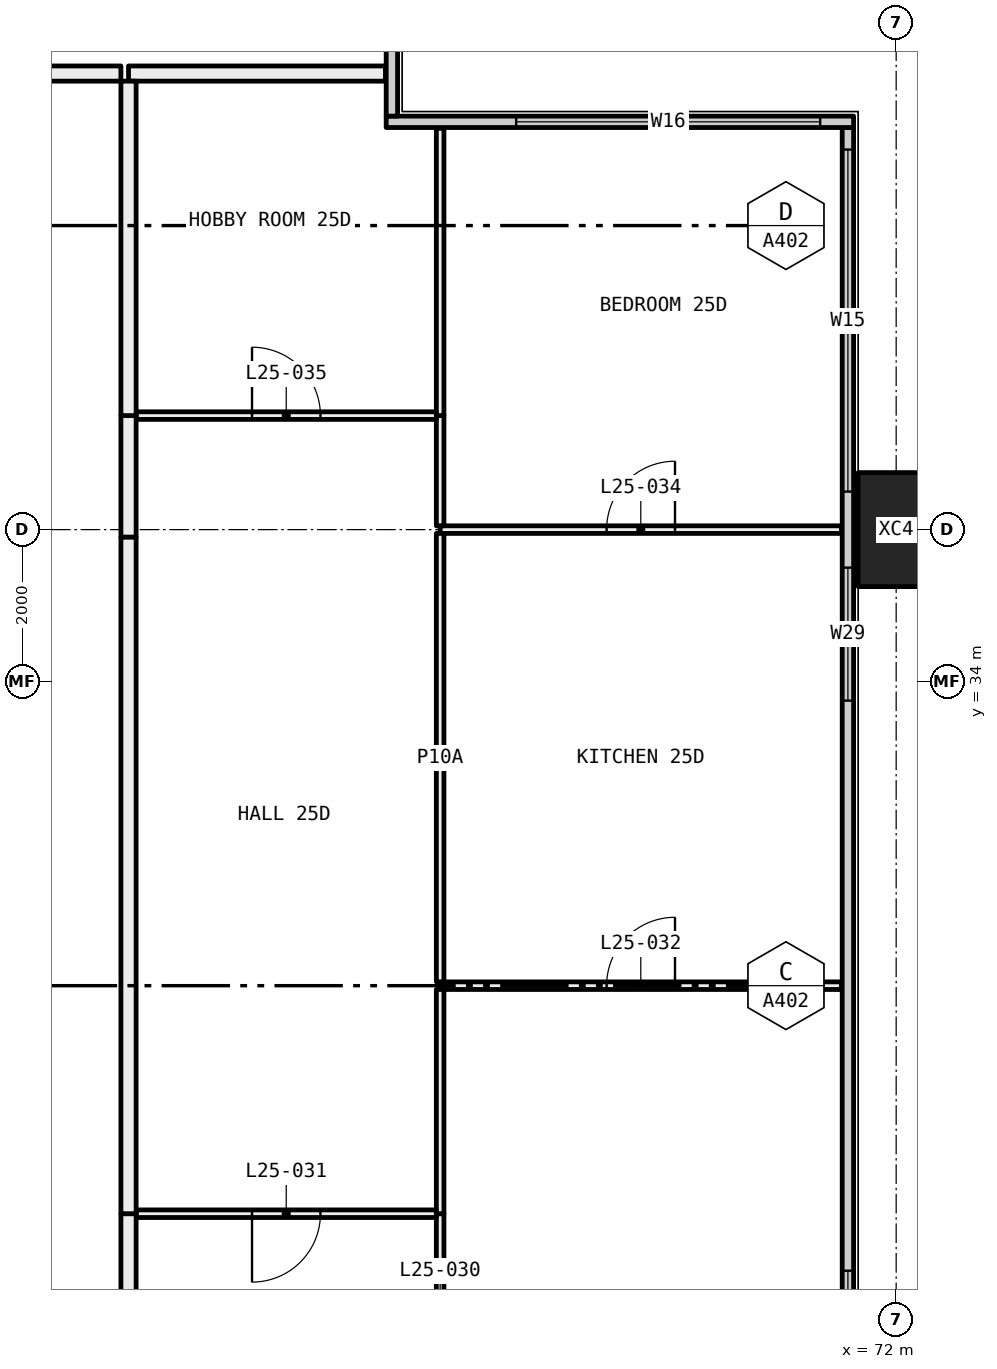
"""IFC4 building model, lengths in metres.
Left out: names, types, materials, properties, quantities, classifications, styles, units other than length and angle.
Written with IfcOpenShell. Run it as: python <this file> out.ifc"""

import sys

from ifc_helpers import new_model, si_unit, direction, frame, frame_2d, origin, origin_2d, place, context, subcontext, project, spatial, rectangle, hollow_rectangle, extrude, element, fill, save


model = new_model("IFC4")
c1 = context("Model", 3, precision=1e-05, world=origin(), true_north=direction((0.0, 1.0)))
c2 = subcontext(c1, "Body", "Model", "MODEL_VIEW")
j1 = project(units=[si_unit("LENGTHUNIT", "METRE"), si_unit("PLANEANGLEUNIT", "RADIAN")], contexts=[c1])
p1 = place(None, origin())
s1 = spatial("IfcSite", under=j1, at=p1, CompositionType="ELEMENT")
p2 = place(p1, origin())
s2 = spatial("IfcBuilding", under=s1, at=p2, CompositionType="ELEMENT")
p3 = place(p2, frame((0.0, 0.0, 100.05)))
s3 = spatial("IfcBuildingStorey", under=s2, at=p3, CompositionType="ELEMENT", Elevation=100.05)
p4 = place(p3, frame((72.0, 36.0, -0.4), z_axis=(0.0, 0.0, 1.0), x_axis=(0.0, 1.0, 0.0)))
e1 = element("IfcColumn", 1, at=p4, inside=s3, PredefinedType="COLUMN", context=c2, shape_type="SweptSolid", body=[
    extrude(hollow_rectangle(XDim=1.5, YDim=1.0, WallThickness=0.06, at=origin_2d()), origin(), (0.0, 0.0, 1.0), 3.45),
])
p5 = place(p3, frame((71.365, 18.71, 0.0), z_axis=(0.0, 0.0, 1.0), x_axis=(0.0, 1.0, 0.0)))
e2 = element("IfcWall", 2, at=p5, inside=s3, PredefinedType="ELEMENTEDWALL", context=c2, shape_type="SweptSolid", body=[
    extrude(rectangle(XDim=22.58, YDim=0.15, at=frame_2d((11.29, 0.0))), origin(), (0.0, 0.0, 1.0), 3.05),
])
p6 = place(p5, frame((0.29, 0.0, 0.45)))
e3 = element("IfcOpeningElement", 3, at=p6, cuts=e2, PredefinedType="OPENING", context=c2, shape_type="SweptSolid", body=[
    extrude(rectangle(XDim=4.5, YDim=2.55, at=frame_2d((2.25, 1.275))), frame((0.0, 0.085, 0.0), z_axis=(0.0, -1.0, 0.0), x_axis=(1.0, 0.0, 0.0)), (0.0, 0.0, 1.0), 0.17),
])
p7 = place(p5, frame((5.79, 0.0, 0.45)))
e4 = element("IfcOpeningElement", 4, at=p7, cuts=e2, PredefinedType="OPENING", context=c2, shape_type="SweptSolid", body=[
    extrude(rectangle(XDim=1.75, YDim=2.55, at=frame_2d((0.875, 1.275))), frame((0.0, 0.085, 0.0), z_axis=(0.0, -1.0, 0.0), x_axis=(1.0, 0.0, 0.0)), (0.0, 0.0, 1.0), 0.17),
])
p8 = place(p5, frame((15.04, 0.0, 0.45)))
e5 = element("IfcOpeningElement", 5, at=p8, cuts=e2, PredefinedType="OPENING", context=c2, shape_type="SweptSolid", body=[
    extrude(rectangle(XDim=1.75, YDim=2.55, at=frame_2d((0.875, 1.275))), frame((0.0, 0.085, 0.0), z_axis=(0.0, -1.0, 0.0), x_axis=(1.0, 0.0, 0.0)), (0.0, 0.0, 1.0), 0.17),
])
p9 = place(p5, frame((17.79, 0.0, 0.45)))
e6 = element("IfcOpeningElement", 6, at=p9, cuts=e2, PredefinedType="OPENING", context=c2, shape_type="SweptSolid", body=[
    extrude(rectangle(XDim=4.5, YDim=2.55, at=frame_2d((2.25, 1.275))), frame((0.0, 0.085, 0.0), z_axis=(0.0, -1.0, 0.0), x_axis=(1.0, 0.0, 0.0)), (0.0, 0.0, 1.0), 0.17),
])
p10 = place(p3, frame((65.29, 41.365, 0.0), z_axis=(0.0, 0.0, 1.0), x_axis=(1.0, 0.0, 0.0)))
e7 = element("IfcWall", 7, at=p10, inside=s3, PredefinedType="ELEMENTEDWALL", context=c2, shape_type="SweptSolid", body=[
    extrude(rectangle(XDim=6.15, YDim=0.15, at=frame_2d((3.075, 0.0))), origin(), (0.0, 0.0, 1.0), 3.05),
])
p11 = place(p10, frame((1.71, 0.0, 0.45)))
e8 = element("IfcOpeningElement", 8, at=p11, cuts=e7, PredefinedType="OPENING", context=c2, shape_type="SweptSolid", body=[
    extrude(rectangle(XDim=4.0, YDim=2.55, at=frame_2d((2.0, 1.275))), frame((0.0, 0.085, 0.0), z_axis=(0.0, -1.0, 0.0), x_axis=(1.0, 0.0, 0.0)), (0.0, 0.0, 1.0), 0.17),
])
p12 = place(p3, frame((65.365, 41.44, 0.0), z_axis=(0.0, 0.0, 1.0), x_axis=(0.0, 1.0, 0.0)))
e9 = element("IfcWall", 9, at=p12, inside=s3, PredefinedType="ELEMENTEDWALL", context=c2, shape_type="SweptSolid", body=[
    extrude(rectangle(XDim=5.85, YDim=0.15, at=frame_2d((2.925, 0.0))), origin(), (0.0, 0.0, 1.0), 3.05),
])
p13 = place(p12, frame((1.56, 0.0, 0.45)))
e10 = element("IfcOpeningElement", 10, at=p13, cuts=e9, PredefinedType="OPENING", context=c2, shape_type="SweptSolid", body=[
    extrude(rectangle(XDim=4.0, YDim=2.55, at=frame_2d((2.0, 1.275))), frame((0.0, 0.085, 0.0), z_axis=(0.0, -1.0, 0.0), x_axis=(1.0, 0.0, 0.0)), (0.0, 0.0, 1.0), 0.17),
])
p14 = place(p3, frame((71.28, 30.0, 0.0), z_axis=(0.0, 0.0, 1.0), x_axis=(-1.0, 0.0, 0.0)))
e11 = element("IfcWall", 11, at=p14, inside=s3, PredefinedType="PARTITIONING", context=c2, shape_type="SweptSolid", body=[
    extrude(rectangle(XDim=5.28, YDim=0.1, at=frame_2d((2.64, 0.0))), origin(), (0.0, 0.0, 1.0), 3.05),
])
p15 = place(p14, frame((2.19, 0.0, 0.0)))
e12 = element("IfcOpeningElement", 12, at=p15, cuts=e11, PredefinedType="OPENING", context=c2, shape_type="SweptSolid", body=[
    extrude(rectangle(XDim=0.9, YDim=2.1, at=frame_2d((0.45, 1.05))), frame((0.0, 0.06, 0.0), z_axis=(0.0, -1.0, 0.0), x_axis=(1.0, 0.0, 0.0)), (0.0, 0.0, 1.0), 0.12),
])
p16 = place(p3, frame((66.0, 27.0, 0.0), z_axis=(0.0, 0.0, 1.0), x_axis=(0.0, -1.0, 0.0)))
e13 = element("IfcWall", 13, at=p16, inside=s3, PredefinedType="PARTITIONING", context=c2, shape_type="SweptSolid", body=[
    extrude(rectangle(XDim=3.1, YDim=0.1, at=frame_2d((1.55, 0.0))), origin(), (0.0, 0.0, 1.0), 2.45),
])
p17 = place(p16, frame((1.1, 0.0, 0.0)))
e14 = element("IfcOpeningElement", 14, at=p17, cuts=e13, PredefinedType="OPENING", context=c2, shape_type="SweptSolid", body=[
    extrude(rectangle(XDim=0.9, YDim=2.1, at=frame_2d((0.45, 1.05))), frame((0.0, 0.06, 0.0), z_axis=(0.0, -1.0, 0.0), x_axis=(1.0, 0.0, 0.0)), (0.0, 0.0, 1.0), 0.12),
])
p18 = place(p3, frame((66.0, 29.95, 0.0), z_axis=(0.0, 0.0, 1.0), x_axis=(0.0, -1.0, 0.0)))
e15 = element("IfcWall", 15, at=p18, inside=s3, PredefinedType="PARTITIONING", context=c2, shape_type="SweptSolid", body=[
    extrude(rectangle(XDim=2.95, YDim=0.1, at=frame_2d((1.475, 0.0))), origin(), (0.0, 0.0, 1.0), 3.05),
])
p19 = place(p3, frame((71.28, 36.0, 0.0), z_axis=(0.0, 0.0, 1.0), x_axis=(-1.0, 0.0, 0.0)))
e16 = element("IfcWall", 16, at=p19, inside=s3, PredefinedType="PARTITIONING", context=c2, shape_type="SweptSolid", body=[
    extrude(rectangle(XDim=5.28, YDim=0.1, at=frame_2d((2.64, 0.0))), origin(), (0.0, 0.0, 1.0), 2.45),
])
p20 = place(p19, frame((2.19, 0.0, 0.0)))
e17 = element("IfcOpeningElement", 17, at=p20, cuts=e16, PredefinedType="OPENING", context=c2, shape_type="SweptSolid", body=[
    extrude(rectangle(XDim=0.9, YDim=2.1, at=frame_2d((0.45, 1.05))), frame((0.0, 0.06, 0.0), z_axis=(0.0, -1.0, 0.0), x_axis=(1.0, 0.0, 0.0)), (0.0, 0.0, 1.0), 0.12),
])
p21 = place(p3, frame((66.0, 35.95, 0.0), z_axis=(0.0, 0.0, 1.0), x_axis=(0.0, -1.0, 0.0)))
e18 = element("IfcWall", 18, at=p21, inside=s3, PredefinedType="PARTITIONING", context=c2, shape_type="SweptSolid", body=[
    extrude(rectangle(XDim=5.9, YDim=0.1, at=frame_2d((2.95, 0.0))), origin(), (0.0, 0.0, 1.0), 2.45),
])
p22 = place(p3, frame((66.0, 37.5, 0.0), z_axis=(0.0, 0.0, 1.0), x_axis=(0.0, -1.0, 0.0)))
e19 = element("IfcWall", 19, at=p22, inside=s3, PredefinedType="PARTITIONING", context=c2, shape_type="SweptSolid", body=[
    extrude(rectangle(XDim=1.45, YDim=0.1, at=frame_2d((0.725, 0.0))), origin(), (0.0, 0.0, 1.0), 2.45),
])
p23 = place(p3, frame((66.0, 41.28, 0.0), z_axis=(0.0, 0.0, 1.0), x_axis=(0.0, -1.0, 0.0)))
e20 = element("IfcWall", 20, at=p23, inside=s3, PredefinedType="PARTITIONING", context=c2, shape_type="SweptSolid", body=[
    extrude(rectangle(XDim=3.78, YDim=0.1, at=frame_2d((1.89, 0.0))), origin(), (0.0, 0.0, 1.0), 3.05),
])
p24 = place(p3, frame((65.95, 27.0, 0.0), z_axis=(0.0, 0.0, 1.0), x_axis=(-1.0, 0.0, 0.0)))
e21 = element("IfcWall", 21, at=p24, inside=s3, PredefinedType="PARTITIONING", context=c2, shape_type="SweptSolid", body=[
    extrude(rectangle(XDim=3.95, YDim=0.1, at=frame_2d((1.975, 0.0))), origin(), (0.0, 0.0, 1.0), 3.05),
])
p25 = place(p24, frame((1.525, 0.0, 0.0)))
e22 = element("IfcOpeningElement", 22, at=p25, cuts=e21, PredefinedType="OPENING", context=c2, shape_type="SweptSolid", body=[
    extrude(rectangle(XDim=0.9, YDim=2.1, at=frame_2d((0.45, 1.05))), frame((0.0, 0.06, 0.0), z_axis=(0.0, -1.0, 0.0), x_axis=(1.0, 0.0, 0.0)), (0.0, 0.0, 1.0), 0.12),
])
p26 = place(p3, frame((61.9, 27.0, 0.0), z_axis=(0.0, 0.0, 1.0), x_axis=(0.0, -1.0, 0.0)))
e23 = element("IfcWall", 23, at=p26, inside=s3, PredefinedType="PARTITIONING", context=c2, shape_type="SweptSolid", body=[
    extrude(rectangle(XDim=3.1, YDim=0.2, at=frame_2d((1.55, 0.0))), origin(), (0.0, 0.0, 1.0), 2.45),
])
p27 = place(p26, frame((1.05, 0.0, 0.0)))
e24 = element("IfcOpeningElement", 24, at=p27, cuts=e23, PredefinedType="OPENING", context=c2, shape_type="SweptSolid", body=[
    extrude(rectangle(XDim=1.0, YDim=2.1, at=frame_2d((0.5, 1.05))), frame((0.0, 0.11, 0.0), z_axis=(0.0, -1.0, 0.0), x_axis=(1.0, 0.0, 0.0)), (0.0, 0.0, 1.0), 0.22),
])
p28 = place(p3, frame((65.95, 37.5, 0.0), z_axis=(0.0, 0.0, 1.0), x_axis=(-1.0, 0.0, 0.0)))
e25 = element("IfcWall", 25, at=p28, inside=s3, PredefinedType="PARTITIONING", context=c2, shape_type="SweptSolid", body=[
    extrude(rectangle(XDim=3.95, YDim=0.1, at=frame_2d((1.975, 0.0))), origin(), (0.0, 0.0, 1.0), 3.05),
])
p29 = place(p28, frame((1.525, 0.0, 0.0)))
e26 = element("IfcOpeningElement", 26, at=p29, cuts=e25, PredefinedType="OPENING", context=c2, shape_type="SweptSolid", body=[
    extrude(rectangle(XDim=0.9, YDim=2.1, at=frame_2d((0.45, 1.05))), frame((0.0, 0.06, 0.0), z_axis=(0.0, -1.0, 0.0), x_axis=(1.0, 0.0, 0.0)), (0.0, 0.0, 1.0), 0.12),
])
p30 = place(p3, frame((61.9, 37.5, 0.0), z_axis=(0.0, 0.0, 1.0), x_axis=(0.0, -1.0, 0.0)))
e27 = element("IfcWall", 27, at=p30, inside=s3, PredefinedType="PARTITIONING", context=c2, shape_type="SweptSolid", body=[
    extrude(rectangle(XDim=1.6, YDim=0.2, at=frame_2d((0.8, 0.0))), origin(), (0.0, 0.0, 1.0), 2.45),
])
p31 = place(p3, frame((61.9, 35.9, 0.0), z_axis=(0.0, 0.0, 1.0), x_axis=(0.0, -1.0, 0.0)))
e28 = element("IfcWall", 28, at=p31, inside=s3, PredefinedType="PARTITIONING", context=c2, shape_type="SweptSolid", body=[
    extrude(rectangle(XDim=8.9, YDim=0.2, at=frame_2d((4.45, 0.0))), origin(), (0.0, 0.0, 1.0), 3.05),
])
p32 = place(p3, frame((65.28, 42.0, 0.0), z_axis=(0.0, 0.0, 1.0), x_axis=(-1.0, 0.0, 0.0)))
e29 = element("IfcWall", 29, at=p32, inside=s3, PredefinedType="PARTITIONING", context=c2, shape_type="SweptSolid", body=[
    extrude(rectangle(XDim=3.38, YDim=0.2, at=frame_2d((1.69, 0.0))), origin(), (0.0, 0.0, 1.0), 3.05),
])
p33 = place(p3, frame((61.9, 41.9, 0.0), z_axis=(0.0, 0.0, 1.0), x_axis=(0.0, -1.0, 0.0)))
e30 = element("IfcWall", 30, at=p33, inside=s3, PredefinedType="PARTITIONING", context=c2, shape_type="SweptSolid", body=[
    extrude(rectangle(XDim=4.4, YDim=0.2, at=frame_2d((2.2, 0.0))), origin(), (0.0, 0.0, 1.0), 3.05),
])
p34 = place(p3, frame((60.0, 42.0, 0.0), z_axis=(0.0, 0.0, 1.0), x_axis=(1.0, 0.0, 0.0)))
e31 = element("IfcWall", 31, at=p34, inside=s3, PredefinedType="PARTITIONING", context=c2, shape_type="SweptSolid", body=[
    extrude(rectangle(XDim=1.8, YDim=0.2, at=frame_2d((0.9, 0.0))), origin(), (0.0, 0.0, 1.0), 3.05),
])
p35 = place(p7, origin())
e32 = element("IfcWindow", 32, at=p35, inside=s3, PartitioningType="SINGLE_PANEL", PredefinedType="WINDOW", context=c2, shape_type="SweptSolid", body=[
    extrude(rectangle(XDim=1.75, YDim=2.55, at=frame_2d((0.875, 1.275))), frame((0.0, 0.03, 0.0), z_axis=(0.0, -1.0, 0.0), x_axis=(1.0, 0.0, 0.0)), (0.0, 0.0, 1.0), 0.06),
])
fill(e4, e32)
p36 = place(p8, origin())
e33 = element("IfcWindow", 33, at=p36, inside=s3, PartitioningType="SINGLE_PANEL", PredefinedType="WINDOW", context=c2, shape_type="SweptSolid", body=[
    extrude(rectangle(XDim=1.75, YDim=2.55, at=frame_2d((0.875, 1.275))), frame((0.0, 0.03, 0.0), z_axis=(0.0, -1.0, 0.0), x_axis=(1.0, 0.0, 0.0)), (0.0, 0.0, 1.0), 0.06),
])
fill(e5, e33)
p37 = place(p9, origin())
e34 = element("IfcWindow", 34, at=p37, inside=s3, PartitioningType="SINGLE_PANEL", PredefinedType="WINDOW", context=c2, shape_type="SweptSolid", body=[
    extrude(rectangle(XDim=4.5, YDim=2.55, at=frame_2d((2.25, 1.275))), frame((0.0, 0.03, 0.0), z_axis=(0.0, -1.0, 0.0), x_axis=(1.0, 0.0, 0.0)), (0.0, 0.0, 1.0), 0.06),
])
fill(e6, e34)
p38 = place(p11, origin())
e35 = element("IfcWindow", 35, at=p38, inside=s3, PartitioningType="SINGLE_PANEL", PredefinedType="WINDOW", context=c2, shape_type="SweptSolid", body=[
    extrude(rectangle(XDim=4.0, YDim=2.55, at=frame_2d((2.0, 1.275))), frame((0.0, 0.03, 0.0), z_axis=(0.0, -1.0, 0.0), x_axis=(1.0, 0.0, 0.0)), (0.0, 0.0, 1.0), 0.06),
])
fill(e8, e35)
p39 = place(p25, origin())
e36 = element("IfcDoor", 36, at=p39, inside=s3, OperationType="SINGLE_SWING_LEFT", PredefinedType="DOOR", context=c2, shape_type="SweptSolid", body=[
    extrude(rectangle(XDim=0.9, YDim=2.1, at=frame_2d((0.45, 1.05))), frame((0.0, 0.025, 0.0), z_axis=(0.0, -1.0, 0.0), x_axis=(1.0, 0.0, 0.0)), (0.0, 0.0, 1.0), 0.05),
])
fill(e22, e36)
p40 = place(p15, frame((0.9, 0.0, 0.0), x_axis=(-1.0, 0.0, 0.0)))
e37 = element("IfcDoor", 37, at=p40, inside=s3, OperationType="SINGLE_SWING_LEFT", PredefinedType="DOOR", context=c2, shape_type="SweptSolid", body=[
    extrude(rectangle(XDim=0.9, YDim=2.1, at=frame_2d((0.45, 1.05))), frame((0.0, 0.025, 0.0), z_axis=(0.0, -1.0, 0.0), x_axis=(1.0, 0.0, 0.0)), (0.0, 0.0, 1.0), 0.05),
])
fill(e12, e37)
p41 = place(p20, frame((0.9, 0.0, 0.0), x_axis=(-1.0, 0.0, 0.0)))
e38 = element("IfcDoor", 38, at=p41, inside=s3, OperationType="SINGLE_SWING_LEFT", PredefinedType="DOOR", context=c2, shape_type="SweptSolid", body=[
    extrude(rectangle(XDim=0.9, YDim=2.1, at=frame_2d((0.45, 1.05))), frame((0.0, 0.025, 0.0), z_axis=(0.0, -1.0, 0.0), x_axis=(1.0, 0.0, 0.0)), (0.0, 0.0, 1.0), 0.05),
])
fill(e17, e38)
p42 = place(p29, frame((0.9, 0.0, 0.0), x_axis=(-1.0, 0.0, 0.0)))
e39 = element("IfcDoor", 39, at=p42, inside=s3, OperationType="SINGLE_SWING_RIGHT", PredefinedType="DOOR", context=c2, shape_type="SweptSolid", body=[
    extrude(rectangle(XDim=0.9, YDim=2.1, at=frame_2d((0.45, 1.05))), frame((0.0, 0.025, 0.0), z_axis=(0.0, -1.0, 0.0), x_axis=(1.0, 0.0, 0.0)), (0.0, 0.0, 1.0), 0.05),
])
fill(e26, e39)
save(model, sys.argv[1])
